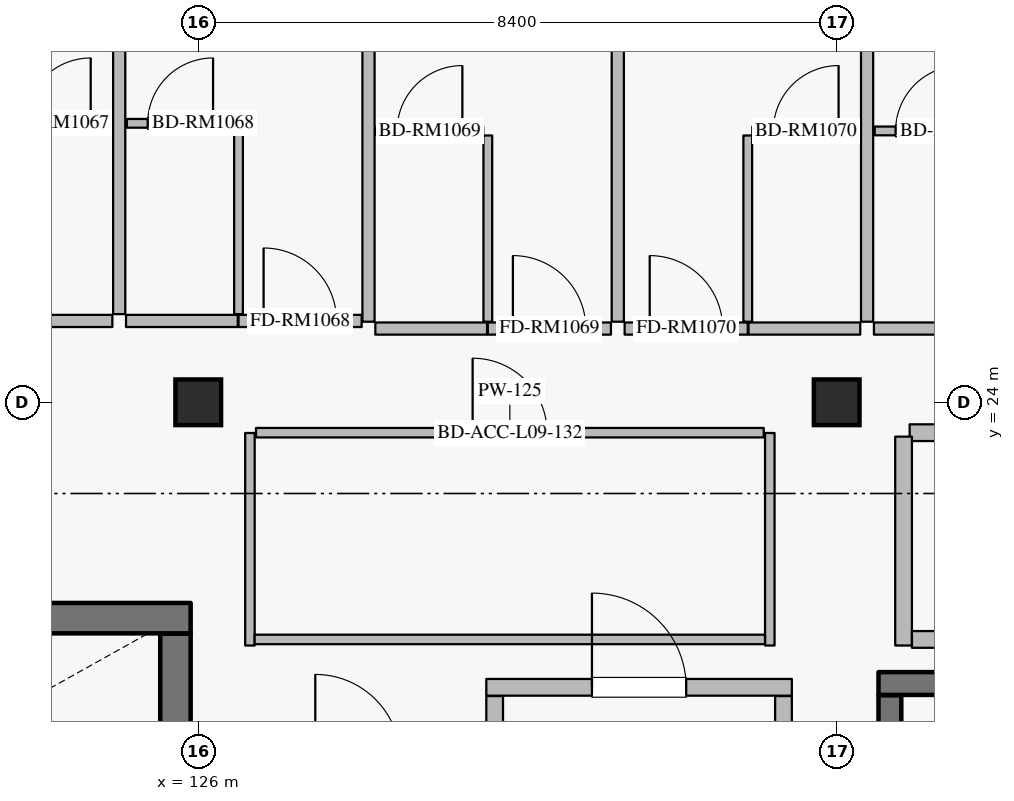
"""IFC4 building model, lengths in metres.
Left out: names, types, materials, properties, quantities, classifications, styles, units other than length and angle.
Written with IfcOpenShell. Run it as: python <this file> out.ifc"""

import sys

from ifc_helpers import new_model, si_unit, direction, frame, frame_2d, origin, origin_2d, place, context, subcontext, project, spatial, rectangle, extrude, element, fill, save


model = new_model("IFC4")
c1 = context("Model", 3, precision=1e-05, world=origin(), true_north=direction((0.0, 1.0)))
c2 = subcontext(c1, "Body", "Model", "MODEL_VIEW")
j1 = project(units=[si_unit("LENGTHUNIT", "METRE"), si_unit("PLANEANGLEUNIT", "RADIAN")], contexts=[c1])
p1 = place(None, origin())
s1 = spatial("IfcSite", under=j1, at=p1, CompositionType="ELEMENT")
p2 = place(p1, origin())
s2 = spatial("IfcBuilding", under=s1, at=p2, CompositionType="ELEMENT")
p3 = place(p2, frame((0.0, 0.0, 39.6)))
s3 = spatial("IfcBuildingStorey", under=s2, at=p3, CompositionType="ELEMENT", Elevation=39.6)
for number, where, z_axis, x_axis in (
    (1, (126.0, 24.0, 0.0), (0.0, 0.0, 1.0), (1.0, 0.0, 0.0)),
    (2, (134.4, 24.0, 0.0), (0.0, 0.0, 1.0), (1.0, 0.0, 0.0)),
):
    element("IfcColumn", number, at=place(p3, frame(where, z_axis=z_axis, x_axis=x_axis)), inside=s3, PredefinedType="COLUMN", context=c2, shape_type="SweptSolid", body=[
        extrude(rectangle(XDim=0.6, YDim=0.6, at=origin_2d()), origin(), (0.0, 0.0, 1.0), 3.6),
    ])
p4 = place(p3, frame((138.05, 20.3, 0.0), z_axis=(0.0, 0.0, 1.0), x_axis=(-1.0, 0.0, 0.0)))
e3 = element("IfcWall", 3, at=p4, inside=s3, PredefinedType="SHEAR", context=c2, shape_type="SweptSolid", body=[
    extrude(rectangle(XDim=3.1, YDim=0.3, at=frame_2d((1.55, 0.0))), origin(), (0.0, 0.0, 1.0), 3.335),
])
p5 = place(p3, frame((135.1, 20.145, 0.0), z_axis=(0.0, 0.0, 1.0), x_axis=(0.0, -1.0, 0.0)))
e4 = element("IfcWall", 4, at=p5, inside=s3, PredefinedType="SHEAR", context=c2, shape_type="SweptSolid", body=[
    extrude(rectangle(XDim=2.59, YDim=0.3, at=frame_2d((1.295, 0.0))), origin(), (0.0, 0.0, 1.0), 3.335),
])
p6 = place(p3, frame((129.9, 19.415, 0.0), z_axis=(0.0, 0.0, 1.0), x_axis=(0.0, 1.0, 0.0)))
e5 = element("IfcWall", 5, at=p6, inside=s3, PredefinedType="PARTITIONING", context=c2, shape_type="SweptSolid", body=[
    extrude(rectangle(XDim=0.72, YDim=0.22, at=frame_2d((0.36, 0.0))), origin(), (0.0, 0.0, 1.0), 3.335),
])
p7 = place(p3, frame((133.7, 16.605, 0.0), z_axis=(0.0, 0.0, 1.0), x_axis=(0.0, 1.0, 0.0)))
e6 = element("IfcWall", 6, at=p7, inside=s3, PredefinedType="PARTITIONING", context=c2, shape_type="SweptSolid", body=[
    extrude(rectangle(XDim=3.53, YDim=0.22, at=frame_2d((1.765, 0.0))), origin(), (0.0, 0.0, 1.0), 3.335),
])
p8 = place(p3, frame((129.79, 20.25, 0.0), z_axis=(0.0, 0.0, 1.0), x_axis=(1.0, 0.0, 0.0)))
e7 = element("IfcWall", 7, at=p8, inside=s3, PredefinedType="PARTITIONING", context=c2, shape_type="SweptSolid", body=[
    extrude(rectangle(XDim=4.02, YDim=0.22, at=frame_2d((2.01, 0.0))), origin(), (0.0, 0.0, 1.0), 3.335),
])
p9 = place(p8, frame((1.39, 0.0, 0.0)))
e8 = element("IfcOpeningElement", 8, at=p9, cuts=e7, PredefinedType="OPENING", context=c2, shape_type="SweptSolid", body=[
    extrude(rectangle(XDim=1.24, YDim=2.2, at=frame_2d((0.62, 1.1))), frame((0.0, 0.12, 0.0), z_axis=(0.0, -1.0, 0.0), x_axis=(1.0, 0.0, 0.0)), (0.0, 0.0, 1.0), 0.24),
])
p10 = place(p3, frame((125.7, 17.005, 0.0), z_axis=(0.0, 0.0, 1.0), x_axis=(0.0, 1.0, 0.0)))
e9 = element("IfcWall", 9, at=p10, inside=s3, PredefinedType="SHEAR", context=c2, shape_type="SweptSolid", body=[
    extrude(rectangle(XDim=3.95, YDim=0.4, at=frame_2d((1.975, 0.0))), origin(), (0.0, 0.0, 1.0), 3.335),
])
p11 = place(p3, frame((117.75, 21.16, 0.0), z_axis=(0.0, 0.0, 1.0), x_axis=(1.0, 0.0, 0.0)))
e10 = element("IfcWall", 10, at=p11, inside=s3, PredefinedType="SHEAR", context=c2, shape_type="SweptSolid", body=[
    extrude(rectangle(XDim=8.15, YDim=0.4, at=frame_2d((4.075, 0.0))), origin(), (0.0, 0.0, 1.0), 3.335),
])
p12 = place(p11, frame((0.38, 0.0, 0.0)))
e11 = element("IfcOpeningElement", 11, at=p12, cuts=e10, PredefinedType="OPENING", context=c2, shape_type="SweptSolid", body=[
    extrude(rectangle(XDim=1.16, YDim=2.2, at=frame_2d((0.58, 1.1))), frame((0.0, 0.21, 0.0), z_axis=(0.0, -1.0, 0.0), x_axis=(1.0, 0.0, 0.0)), (0.0, 0.0, 1.0), 0.42),
])
p13 = place(p3, frame((123.4, 25.07, 0.0), z_axis=(0.0, 0.0, 1.0), x_axis=(1.0, 0.0, 0.0)))
e12 = element("IfcWall", 12, at=p13, inside=s3, PredefinedType="PARTITIONING", context=c2, shape_type="SweptSolid", body=[
    extrude(rectangle(XDim=1.47, YDim=0.16, at=frame_2d((0.735, 0.0))), origin(), (0.0, 0.0, 1.0), 3.335),
])
p14 = place(p3, frame((123.45, 27.67, 0.0), z_axis=(0.0, 0.0, 1.0), x_axis=(1.0, 0.0, 0.0)))
e13 = element("IfcWall", 13, at=p14, inside=s3, PredefinedType="PARTITIONING", context=c2, shape_type="SweptSolid", body=[
    extrude(rectangle(XDim=1.41, YDim=0.115, at=frame_2d((0.705, 0.0))), origin(), (0.0, 0.0, 1.0), 3.335),
])
p15 = place(p14, frame((0.275, 0.0, 0.0)))
e14 = element("IfcOpeningElement", 14, at=p15, cuts=e13, PredefinedType="OPENING", context=c2, shape_type="SweptSolid", body=[
    extrude(rectangle(XDim=0.86, YDim=2.12, at=frame_2d((0.43, 1.06))), frame((0.0, 0.067, 0.0), z_axis=(0.0, -1.0, 0.0), x_axis=(1.0, 0.0, 0.0)), (0.0, 0.0, 1.0), 0.135),
])
p16 = place(p3, frame((125.05, 25.07, 0.0), z_axis=(0.0, 0.0, 1.0), x_axis=(1.0, 0.0, 0.0)))
e15 = element("IfcWall", 15, at=p16, inside=s3, PredefinedType="PARTITIONING", context=c2, shape_type="SweptSolid", body=[
    extrude(rectangle(XDim=1.47, YDim=0.16, at=frame_2d((0.735, 0.0))), origin(), (0.0, 0.0, 1.0), 3.335),
])
p17 = place(p3, frame((126.53, 25.07, 0.0), z_axis=(0.0, 0.0, 1.0), x_axis=(1.0, 0.0, 0.0)))
e16 = element("IfcWall", 16, at=p17, inside=s3, PredefinedType="PARTITIONING", context=c2, shape_type="SweptSolid", body=[
    extrude(rectangle(XDim=1.62, YDim=0.16, at=frame_2d((0.81, 0.0))), origin(), (0.0, 0.0, 1.0), 3.335),
])
p18 = place(p17, frame((0.33, 0.0, 0.0)))
e17 = element("IfcOpeningElement", 17, at=p18, cuts=e16, PredefinedType="OPENING", context=c2, shape_type="SweptSolid", body=[
    extrude(rectangle(XDim=0.96, YDim=2.2, at=frame_2d((0.48, 1.1))), frame((0.0, 0.09, 0.0), z_axis=(0.0, -1.0, 0.0), x_axis=(1.0, 0.0, 0.0)), (0.0, 0.0, 1.0), 0.18),
])
p19 = place(p3, frame((126.53, 25.16, 0.0), z_axis=(0.0, 0.0, 1.0), x_axis=(0.0, 1.0, 0.0)))
e18 = element("IfcWall", 18, at=p19, inside=s3, PredefinedType="PARTITIONING", context=c2, shape_type="SweptSolid", body=[
    extrude(rectangle(XDim=2.45, YDim=0.115, at=frame_2d((1.225, 0.0))), origin(), (0.0, 0.0, 1.0), 3.335),
])
p20 = place(p3, frame((125.06, 27.67, 0.0), z_axis=(0.0, 0.0, 1.0), x_axis=(1.0, 0.0, 0.0)))
e19 = element("IfcWall", 19, at=p20, inside=s3, PredefinedType="PARTITIONING", context=c2, shape_type="SweptSolid", body=[
    extrude(rectangle(XDim=1.41, YDim=0.115, at=frame_2d((0.705, 0.0))), origin(), (0.0, 0.0, 1.0), 3.335),
])
p21 = place(p20, frame((0.275, 0.0, 0.0)))
e20 = element("IfcOpeningElement", 20, at=p21, cuts=e19, PredefinedType="OPENING", context=c2, shape_type="SweptSolid", body=[
    extrude(rectangle(XDim=0.86, YDim=2.12, at=frame_2d((0.43, 1.06))), frame((0.0, 0.067, 0.0), z_axis=(0.0, -1.0, 0.0), x_axis=(1.0, 0.0, 0.0)), (0.0, 0.0, 1.0), 0.135),
])
p22 = place(p3, frame((124.96, 25.16, 0.0), z_axis=(0.0, 0.0, 1.0), x_axis=(0.0, 1.0, 0.0)))
e21 = element("IfcWall", 21, at=p22, inside=s3, PredefinedType="PARTITIONING", context=c2, shape_type="SweptSolid", body=[
    extrude(rectangle(XDim=6.5, YDim=0.16, at=frame_2d((3.25, 0.0))), origin(), (0.0, 0.0, 1.0), 3.335),
])
p23 = place(p3, frame((128.33, 24.97, 0.0), z_axis=(0.0, 0.0, 1.0), x_axis=(1.0, 0.0, 0.0)))
e22 = element("IfcWall", 22, at=p23, inside=s3, PredefinedType="PARTITIONING", context=c2, shape_type="SweptSolid", body=[
    extrude(rectangle(XDim=1.47, YDim=0.16, at=frame_2d((0.735, 0.0))), origin(), (0.0, 0.0, 1.0), 3.335),
])
p24 = place(p3, frame((129.81, 24.97, 0.0), z_axis=(0.0, 0.0, 1.0), x_axis=(1.0, 0.0, 0.0)))
e23 = element("IfcWall", 23, at=p24, inside=s3, PredefinedType="PARTITIONING", context=c2, shape_type="SweptSolid", body=[
    extrude(rectangle(XDim=1.62, YDim=0.16, at=frame_2d((0.81, 0.0))), origin(), (0.0, 0.0, 1.0), 3.335),
])
p25 = place(p24, frame((0.33, 0.0, 0.0)))
e24 = element("IfcOpeningElement", 24, at=p25, cuts=e23, PredefinedType="OPENING", context=c2, shape_type="SweptSolid", body=[
    extrude(rectangle(XDim=0.96, YDim=2.2, at=frame_2d((0.48, 1.1))), frame((0.0, 0.09, 0.0), z_axis=(0.0, -1.0, 0.0), x_axis=(1.0, 0.0, 0.0)), (0.0, 0.0, 1.0), 0.18),
])
p26 = place(p3, frame((129.81, 25.06, 0.0), z_axis=(0.0, 0.0, 1.0), x_axis=(0.0, 1.0, 0.0)))
e25 = element("IfcWall", 25, at=p26, inside=s3, PredefinedType="PARTITIONING", context=c2, shape_type="SweptSolid", body=[
    extrude(rectangle(XDim=2.45, YDim=0.115, at=frame_2d((1.225, 0.0))), origin(), (0.0, 0.0, 1.0), 3.335),
])
p27 = place(p3, frame((128.34, 27.57, 0.0), z_axis=(0.0, 0.0, 1.0), x_axis=(1.0, 0.0, 0.0)))
e26 = element("IfcWall", 26, at=p27, inside=s3, PredefinedType="PARTITIONING", context=c2, shape_type="SweptSolid", body=[
    extrude(rectangle(XDim=1.41, YDim=0.115, at=frame_2d((0.705, 0.0))), origin(), (0.0, 0.0, 1.0), 3.335),
])
p28 = place(p27, frame((0.275, 0.0, 0.0)))
e27 = element("IfcOpeningElement", 27, at=p28, cuts=e26, PredefinedType="OPENING", context=c2, shape_type="SweptSolid", body=[
    extrude(rectangle(XDim=0.86, YDim=2.12, at=frame_2d((0.43, 1.06))), frame((0.0, 0.067, 0.0), z_axis=(0.0, -1.0, 0.0), x_axis=(1.0, 0.0, 0.0)), (0.0, 0.0, 1.0), 0.135),
])
p29 = place(p3, frame((128.24, 25.06, 0.0), z_axis=(0.0, 0.0, 1.0), x_axis=(0.0, 1.0, 0.0)))
e28 = element("IfcWall", 28, at=p29, inside=s3, PredefinedType="PARTITIONING", context=c2, shape_type="SweptSolid", body=[
    extrude(rectangle(XDim=6.6, YDim=0.16, at=frame_2d((3.3, 0.0))), origin(), (0.0, 0.0, 1.0), 3.335),
])
p30 = place(p3, frame((131.61, 24.97, 0.0), z_axis=(0.0, 0.0, 1.0), x_axis=(1.0, 0.0, 0.0)))
e29 = element("IfcWall", 29, at=p30, inside=s3, PredefinedType="PARTITIONING", context=c2, shape_type="SweptSolid", body=[
    extrude(rectangle(XDim=1.62, YDim=0.16, at=frame_2d((0.81, 0.0))), origin(), (0.0, 0.0, 1.0), 3.335),
])
p31 = place(p30, frame((0.33, 0.0, 0.0)))
e30 = element("IfcOpeningElement", 30, at=p31, cuts=e29, PredefinedType="OPENING", context=c2, shape_type="SweptSolid", body=[
    extrude(rectangle(XDim=0.96, YDim=2.2, at=frame_2d((0.48, 1.1))), frame((0.0, 0.09, 0.0), z_axis=(0.0, -1.0, 0.0), x_axis=(1.0, 0.0, 0.0)), (0.0, 0.0, 1.0), 0.18),
])
p32 = place(p3, frame((133.24, 24.97, 0.0), z_axis=(0.0, 0.0, 1.0), x_axis=(1.0, 0.0, 0.0)))
e31 = element("IfcWall", 31, at=p32, inside=s3, PredefinedType="PARTITIONING", context=c2, shape_type="SweptSolid", body=[
    extrude(rectangle(XDim=1.47, YDim=0.16, at=frame_2d((0.735, 0.0))), origin(), (0.0, 0.0, 1.0), 3.335),
])
p33 = place(p3, frame((133.23, 25.06, 0.0), z_axis=(0.0, 0.0, 1.0), x_axis=(0.0, 1.0, 0.0)))
e32 = element("IfcWall", 32, at=p33, inside=s3, PredefinedType="PARTITIONING", context=c2, shape_type="SweptSolid", body=[
    extrude(rectangle(XDim=2.45, YDim=0.115, at=frame_2d((1.225, 0.0))), origin(), (0.0, 0.0, 1.0), 3.335),
])
p34 = place(p3, frame((133.29, 27.57, 0.0), z_axis=(0.0, 0.0, 1.0), x_axis=(1.0, 0.0, 0.0)))
e33 = element("IfcWall", 33, at=p34, inside=s3, PredefinedType="PARTITIONING", context=c2, shape_type="SweptSolid", body=[
    extrude(rectangle(XDim=1.41, YDim=0.115, at=frame_2d((0.705, 0.0))), origin(), (0.0, 0.0, 1.0), 3.335),
])
p35 = place(p34, frame((0.275, 0.0, 0.0)))
e34 = element("IfcOpeningElement", 34, at=p35, cuts=e33, PredefinedType="OPENING", context=c2, shape_type="SweptSolid", body=[
    extrude(rectangle(XDim=0.86, YDim=2.12, at=frame_2d((0.43, 1.06))), frame((0.0, 0.067, 0.0), z_axis=(0.0, -1.0, 0.0), x_axis=(1.0, 0.0, 0.0)), (0.0, 0.0, 1.0), 0.135),
])
p36 = place(p3, frame((131.52, 25.06, 0.0), z_axis=(0.0, 0.0, 1.0), x_axis=(0.0, 1.0, 0.0)))
e35 = element("IfcWall", 35, at=p36, inside=s3, PredefinedType="PARTITIONING", context=c2, shape_type="SweptSolid", body=[
    extrude(rectangle(XDim=6.6, YDim=0.16, at=frame_2d((3.3, 0.0))), origin(), (0.0, 0.0, 1.0), 3.335),
])
p37 = place(p3, frame((134.89, 24.97, 0.0), z_axis=(0.0, 0.0, 1.0), x_axis=(1.0, 0.0, 0.0)))
e36 = element("IfcWall", 36, at=p37, inside=s3, PredefinedType="PARTITIONING", context=c2, shape_type="SweptSolid", body=[
    extrude(rectangle(XDim=1.47, YDim=0.16, at=frame_2d((0.735, 0.0))), origin(), (0.0, 0.0, 1.0), 3.335),
])
p38 = place(p3, frame((134.9, 27.57, 0.0), z_axis=(0.0, 0.0, 1.0), x_axis=(1.0, 0.0, 0.0)))
e37 = element("IfcWall", 37, at=p38, inside=s3, PredefinedType="PARTITIONING", context=c2, shape_type="SweptSolid", body=[
    extrude(rectangle(XDim=1.41, YDim=0.115, at=frame_2d((0.705, 0.0))), origin(), (0.0, 0.0, 1.0), 3.335),
])
p39 = place(p38, frame((0.275, 0.0, 0.0)))
e38 = element("IfcOpeningElement", 38, at=p39, cuts=e37, PredefinedType="OPENING", context=c2, shape_type="SweptSolid", body=[
    extrude(rectangle(XDim=0.86, YDim=2.12, at=frame_2d((0.43, 1.06))), frame((0.0, 0.067, 0.0), z_axis=(0.0, -1.0, 0.0), x_axis=(1.0, 0.0, 0.0)), (0.0, 0.0, 1.0), 0.135),
])
p40 = place(p3, frame((134.8, 25.06, 0.0), z_axis=(0.0, 0.0, 1.0), x_axis=(0.0, 1.0, 0.0)))
e39 = element("IfcWall", 39, at=p40, inside=s3, PredefinedType="PARTITIONING", context=c2, shape_type="SweptSolid", body=[
    extrude(rectangle(XDim=6.6, YDim=0.16, at=frame_2d((3.3, 0.0))), origin(), (0.0, 0.0, 1.0), 3.335),
])
p41 = place(p3, frame((135.36, 23.6, 0.0), z_axis=(0.0, 0.0, 1.0), x_axis=(1.0, 0.0, 0.0)))
e40 = element("IfcWall", 40, at=p41, inside=s3, PredefinedType="PARTITIONING", context=c2, shape_type="SweptSolid", body=[
    extrude(rectangle(XDim=2.88, YDim=0.22, at=frame_2d((1.44, 0.0))), origin(), (0.0, 0.0, 1.0), 3.335),
])
p42 = place(p41, frame((0.97, 0.0, 0.0)))
e41 = element("IfcOpeningElement", 41, at=p42, cuts=e40, PredefinedType="OPENING", context=c2, shape_type="SweptSolid", body=[
    extrude(rectangle(XDim=0.94, YDim=2.15, at=frame_2d((0.47, 1.075))), frame((0.0, 0.12, 0.0), z_axis=(0.0, -1.0, 0.0), x_axis=(1.0, 0.0, 0.0)), (0.0, 0.0, 1.0), 0.24),
])
p43 = place(p3, frame((126.76, 23.6, 0.0), z_axis=(0.0, 0.0, 1.0), x_axis=(1.0, 0.0, 0.0)))
e42 = element("IfcWall", 42, at=p43, inside=s3, PredefinedType="PARTITIONING", context=c2, shape_type="SweptSolid", body=[
    extrude(rectangle(XDim=6.68, YDim=0.125, at=frame_2d((3.34, 0.0))), origin(), (0.0, 0.0, 1.0), 3.335),
])
p44 = place(p43, frame((2.85, 0.0, 0.0)))
e43 = element("IfcOpeningElement", 43, at=p44, cuts=e42, PredefinedType="OPENING", context=c2, shape_type="SweptSolid", body=[
    extrude(rectangle(XDim=0.98, YDim=2.15, at=frame_2d((0.49, 1.075))), frame((0.0, 0.073, 0.0), z_axis=(0.0, -1.0, 0.0), x_axis=(1.0, 0.0, 0.0)), (0.0, 0.0, 1.0), 0.145),
])
p45 = place(p3, frame((135.28, 20.8, 0.0), z_axis=(0.0, 0.0, 1.0), x_axis=(0.0, 1.0, 0.0)))
e44 = element("IfcWall", 44, at=p45, inside=s3, PredefinedType="PARTITIONING", context=c2, shape_type="SweptSolid", body=[
    extrude(rectangle(XDim=2.748, YDim=0.22, at=frame_2d((1.374, 0.0))), origin(), (0.0, 0.0, 1.0), 3.335),
])
p46 = place(p3, frame((135.39, 20.88, 0.0), z_axis=(0.0, 0.0, 1.0), x_axis=(1.0, 0.0, 0.0)))
e45 = element("IfcWall", 45, at=p46, inside=s3, PredefinedType="PARTITIONING", context=c2, shape_type="SweptSolid", body=[
    extrude(rectangle(XDim=2.82, YDim=0.22, at=frame_2d((1.41, 0.0))), origin(), (0.0, 0.0, 1.0), 3.335),
])
for number, where, z_axis, x_axis in (
    (46, (126.68, 20.8, 0.0), (0.0, 0.0, 1.0), (0.0, 1.0, 0.0)),
    (47, (133.52, 20.8, 0.0), (0.0, 0.0, 1.0), (0.0, 1.0, 0.0)),
):
    element("IfcWall", number, at=place(p3, frame(where, z_axis=z_axis, x_axis=x_axis)), inside=s3, PredefinedType="PARTITIONING", context=c2, shape_type="SweptSolid", body=[
        extrude(rectangle(XDim=2.796, YDim=0.125, at=frame_2d((1.398, 0.0))), origin(), (0.0, 0.0, 1.0), 3.335),
    ])
p47 = place(p3, frame((126.742, 20.88, 0.0), z_axis=(0.0, 0.0, 1.0), x_axis=(1.0, 0.0, 0.0)))
e48 = element("IfcWall", 48, at=p47, inside=s3, PredefinedType="PARTITIONING", context=c2, shape_type="SweptSolid", body=[
    extrude(rectangle(XDim=6.715, YDim=0.125, at=frame_2d((3.357, 0.0))), origin(), (0.0, 0.0, 1.0), 3.335),
])
p48 = place(p9, origin())
e49 = element("IfcDoor", 49, at=p48, inside=s3, OperationType="SINGLE_SWING_LEFT", PredefinedType="DOOR", context=c2, shape_type="SweptSolid", body=[
    extrude(rectangle(XDim=1.24, YDim=2.2, at=frame_2d((0.62, 1.1))), frame((0.0, 0.025, 0.0), z_axis=(0.0, -1.0, 0.0), x_axis=(1.0, 0.0, 0.0)), (0.0, 0.0, 1.0), 0.05),
])
fill(e8, e49)
p49 = place(p15, origin())
e50 = element("IfcDoor", 50, at=p49, inside=s3, OperationType="SINGLE_SWING_RIGHT", PredefinedType="DOOR", context=c2, shape_type="SweptSolid", body=[
    extrude(rectangle(XDim=0.86, YDim=2.12, at=frame_2d((0.43, 1.06))), frame((0.0, 0.025, 0.0), z_axis=(0.0, -1.0, 0.0), x_axis=(1.0, 0.0, 0.0)), (0.0, 0.0, 1.0), 0.05),
])
fill(e14, e50)
p50 = place(p18, origin())
e51 = element("IfcDoor", 51, at=p50, inside=s3, OperationType="SINGLE_SWING_LEFT", PredefinedType="DOOR", context=c2, shape_type="SweptSolid", body=[
    extrude(rectangle(XDim=0.96, YDim=2.2, at=frame_2d((0.48, 1.1))), frame((0.0, 0.025, 0.0), z_axis=(0.0, -1.0, 0.0), x_axis=(1.0, 0.0, 0.0)), (0.0, 0.0, 1.0), 0.05),
])
fill(e17, e51)
p51 = place(p21, origin())
e52 = element("IfcDoor", 52, at=p51, inside=s3, OperationType="SINGLE_SWING_RIGHT", PredefinedType="DOOR", context=c2, shape_type="SweptSolid", body=[
    extrude(rectangle(XDim=0.86, YDim=2.12, at=frame_2d((0.43, 1.06))), frame((0.0, 0.025, 0.0), z_axis=(0.0, -1.0, 0.0), x_axis=(1.0, 0.0, 0.0)), (0.0, 0.0, 1.0), 0.05),
])
fill(e20, e52)
p52 = place(p25, origin())
e53 = element("IfcDoor", 53, at=p52, inside=s3, OperationType="SINGLE_SWING_LEFT", PredefinedType="DOOR", context=c2, shape_type="SweptSolid", body=[
    extrude(rectangle(XDim=0.96, YDim=2.2, at=frame_2d((0.48, 1.1))), frame((0.0, 0.025, 0.0), z_axis=(0.0, -1.0, 0.0), x_axis=(1.0, 0.0, 0.0)), (0.0, 0.0, 1.0), 0.05),
])
fill(e24, e53)
p53 = place(p28, origin())
e54 = element("IfcDoor", 54, at=p53, inside=s3, OperationType="SINGLE_SWING_RIGHT", PredefinedType="DOOR", context=c2, shape_type="SweptSolid", body=[
    extrude(rectangle(XDim=0.86, YDim=2.12, at=frame_2d((0.43, 1.06))), frame((0.0, 0.025, 0.0), z_axis=(0.0, -1.0, 0.0), x_axis=(1.0, 0.0, 0.0)), (0.0, 0.0, 1.0), 0.05),
])
fill(e27, e54)
p54 = place(p31, origin())
e55 = element("IfcDoor", 55, at=p54, inside=s3, OperationType="SINGLE_SWING_LEFT", PredefinedType="DOOR", context=c2, shape_type="SweptSolid", body=[
    extrude(rectangle(XDim=0.96, YDim=2.2, at=frame_2d((0.48, 1.1))), frame((0.0, 0.025, 0.0), z_axis=(0.0, -1.0, 0.0), x_axis=(1.0, 0.0, 0.0)), (0.0, 0.0, 1.0), 0.05),
])
fill(e30, e55)
p55 = place(p35, origin())
e56 = element("IfcDoor", 56, at=p55, inside=s3, OperationType="SINGLE_SWING_RIGHT", PredefinedType="DOOR", context=c2, shape_type="SweptSolid", body=[
    extrude(rectangle(XDim=0.86, YDim=2.12, at=frame_2d((0.43, 1.06))), frame((0.0, 0.025, 0.0), z_axis=(0.0, -1.0, 0.0), x_axis=(1.0, 0.0, 0.0)), (0.0, 0.0, 1.0), 0.05),
])
fill(e34, e56)
p56 = place(p39, origin())
e57 = element("IfcDoor", 57, at=p56, inside=s3, OperationType="SINGLE_SWING_RIGHT", PredefinedType="DOOR", context=c2, shape_type="SweptSolid", body=[
    extrude(rectangle(XDim=0.86, YDim=2.12, at=frame_2d((0.43, 1.06))), frame((0.0, 0.025, 0.0), z_axis=(0.0, -1.0, 0.0), x_axis=(1.0, 0.0, 0.0)), (0.0, 0.0, 1.0), 0.05),
])
fill(e38, e57)
p57 = place(p44, origin())
e58 = element("IfcDoor", 58, at=p57, inside=s3, OperationType="SINGLE_SWING_LEFT", PredefinedType="DOOR", context=c2, shape_type="SweptSolid", body=[
    extrude(rectangle(XDim=0.98, YDim=2.15, at=frame_2d((0.49, 1.075))), frame((0.0, 0.025, 0.0), z_axis=(0.0, -1.0, 0.0), x_axis=(1.0, 0.0, 0.0)), (0.0, 0.0, 1.0), 0.05),
])
fill(e43, e58)
save(model, sys.argv[1])
